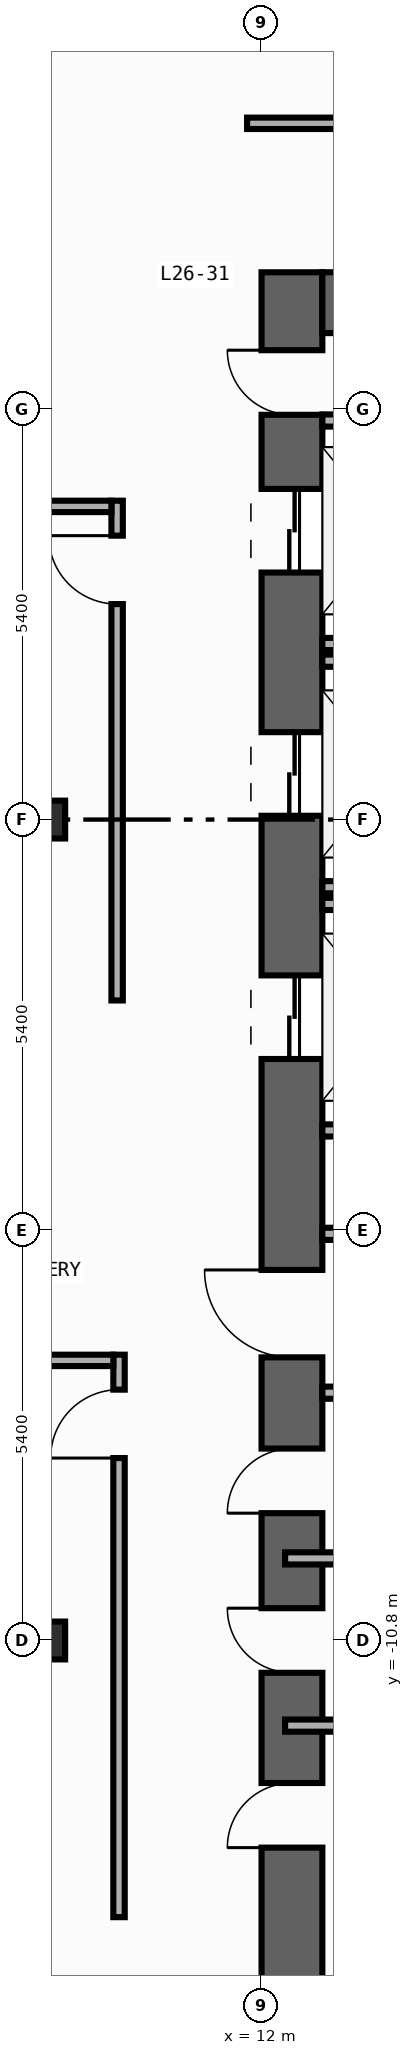
"""IFC4 building model, lengths in metres.
Left out: names, types, materials, properties, quantities, classifications, styles, units other than length and angle.
Written with IfcOpenShell. Run it as: python <this file> out.ifc"""

import sys

from ifc_helpers import new_model, si_unit, direction, frame, frame_2d, origin, origin_2d, place, context, subcontext, project, spatial, rectangle, i_section, extrude, element, fill, save


model = new_model("IFC4")
c1 = context("Model", 3, precision=1e-05, world=origin(), true_north=direction((0.0, 1.0)))
c2 = subcontext(c1, "Body", "Model", "MODEL_VIEW")
j1 = project(units=[si_unit("LENGTHUNIT", "METRE"), si_unit("PLANEANGLEUNIT", "RADIAN")], contexts=[c1])
p1 = place(None, origin())
s1 = spatial("IfcSite", under=j1, at=p1, CompositionType="ELEMENT")
p2 = place(p1, origin())
s2 = spatial("IfcBuilding", under=s1, at=p2, CompositionType="ELEMENT")
p3 = place(p2, frame((0.0, 0.0, 114.2)))
s3 = spatial("IfcBuildingStorey", under=s2, at=p3, CompositionType="ELEMENT", Elevation=114.2)
p4 = place(p3, frame((12.4, -19.8, 0.0), z_axis=(0.0, 0.0, 1.0), x_axis=(0.0, 1.0, 0.0)))
e1 = element("IfcWall", 1, at=p4, inside=s3, PredefinedType="SHEAR", context=c2, shape_type="SweptSolid", body=[
    extrude(rectangle(XDim=27.0, YDim=0.8, at=frame_2d((13.5, 0.0))), origin(), (0.0, 0.0, 1.0), 3.94),
])
p5 = place(p4, frame((23.05, 0.0, 0.0)))
e2 = element("IfcOpeningElement", 2, at=p5, cuts=e1, PredefinedType="OPENING", context=c2, shape_type="SweptSolid", body=[
    extrude(rectangle(XDim=1.1, YDim=2.2, at=frame_2d((0.55, 1.1))), frame((0.0, 0.41, 0.0), z_axis=(0.0, -1.0, 0.0), x_axis=(1.0, 0.0, 0.0)), (0.0, 0.0, 1.0), 0.82),
])
p6 = place(p4, frame((19.85, 0.0, 0.0)))
e3 = element("IfcOpeningElement", 3, at=p6, cuts=e1, PredefinedType="OPENING", context=c2, shape_type="SweptSolid", body=[
    extrude(rectangle(XDim=1.1, YDim=2.2, at=frame_2d((0.55, 1.1))), frame((0.0, 0.41, 0.0), z_axis=(0.0, -1.0, 0.0), x_axis=(1.0, 0.0, 0.0)), (0.0, 0.0, 1.0), 0.82),
])
p7 = place(p4, frame((16.65, 0.0, 0.0)))
e4 = element("IfcOpeningElement", 4, at=p7, cuts=e1, PredefinedType="OPENING", context=c2, shape_type="SweptSolid", body=[
    extrude(rectangle(XDim=1.1, YDim=2.2, at=frame_2d((0.55, 1.1))), frame((0.0, 0.41, 0.0), z_axis=(0.0, -1.0, 0.0), x_axis=(1.0, 0.0, 0.0)), (0.0, 0.0, 1.0), 0.82),
])
p8 = place(p4, frame((6.275, 0.0, 0.0)))
e5 = element("IfcOpeningElement", 5, at=p8, cuts=e1, PredefinedType="OPENING", context=c2, shape_type="SweptSolid", body=[
    extrude(rectangle(XDim=0.85, YDim=2.1, at=frame_2d((0.425, 1.05))), frame((0.0, 0.41, 0.0), z_axis=(0.0, -1.0, 0.0), x_axis=(1.0, 0.0, 0.0)), (0.0, 0.0, 1.0), 0.82),
])
p9 = place(p4, frame((8.575, 0.0, 0.0)))
e6 = element("IfcOpeningElement", 6, at=p9, cuts=e1, PredefinedType="OPENING", context=c2, shape_type="SweptSolid", body=[
    extrude(rectangle(XDim=0.85, YDim=2.1, at=frame_2d((0.425, 1.05))), frame((0.0, 0.41, 0.0), z_axis=(0.0, -1.0, 0.0), x_axis=(1.0, 0.0, 0.0)), (0.0, 0.0, 1.0), 0.82),
])
p10 = place(p4, frame((10.675, 0.0, 0.0)))
e7 = element("IfcOpeningElement", 7, at=p10, cuts=e1, PredefinedType="OPENING", context=c2, shape_type="SweptSolid", body=[
    extrude(rectangle(XDim=0.85, YDim=2.1, at=frame_2d((0.425, 1.05))), frame((0.0, 0.41, 0.0), z_axis=(0.0, -1.0, 0.0), x_axis=(1.0, 0.0, 0.0)), (0.0, 0.0, 1.0), 0.82),
])
p11 = place(p4, frame((12.725, 0.0, 0.0)))
e8 = element("IfcOpeningElement", 8, at=p11, cuts=e1, PredefinedType="OPENING", context=c2, shape_type="SweptSolid", body=[
    extrude(rectangle(XDim=1.15, YDim=2.2, at=frame_2d((0.575, 1.1))), frame((0.0, 0.41, 0.0), z_axis=(0.0, -1.0, 0.0), x_axis=(1.0, 0.0, 0.0)), (0.0, 0.0, 1.0), 0.82),
])
p12 = place(p4, frame((25.125, 0.0, 0.0)))
e9 = element("IfcOpeningElement", 9, at=p12, cuts=e1, PredefinedType="OPENING", context=c2, shape_type="SweptSolid", body=[
    extrude(rectangle(XDim=0.85, YDim=2.1, at=frame_2d((0.425, 1.05))), frame((0.0, 0.41, 0.0), z_axis=(0.0, -1.0, 0.0), x_axis=(1.0, 0.0, 0.0)), (0.0, 0.0, 1.0), 0.82),
])
p13 = place(p3, frame((12.8, 6.8, 0.0), z_axis=(0.0, 0.0, 1.0), x_axis=(1.0, 0.0, 0.0)))
e10 = element("IfcWall", 10, at=p13, inside=s3, PredefinedType="SHEAR", context=c2, shape_type="SweptSolid", body=[
    extrude(rectangle(XDim=6.8, YDim=0.8, at=frame_2d((3.4, 0.0))), origin(), (0.0, 0.0, 1.0), 3.94),
])
for number, where, z_axis, x_axis in (
    (11, (9.2, -10.8, 0.0), (0.0, 0.0, 1.0), (1.0, 0.0, 0.0)),
    (12, (9.2, 0.0, 0.0), (0.0, 0.0, 1.0), (1.0, 0.0, 0.0)),
):
    element("IfcColumn", number, at=place(p3, frame(where, z_axis=z_axis, x_axis=x_axis)), inside=s3, PredefinedType="COLUMN", context=c2, shape_type="SweptSolid", body=[
        extrude(i_section(OverallWidth=0.432, OverallDepth=0.498, WebThickness=0.045, FlangeThickness=0.07, FilletRadius=0.022, at=origin_2d()), origin(), (0.0, 0.0, 1.0), 4.2),
    ])
for number, where, z_axis, x_axis in (
    (13, (12.8, 2.31, 0.0), (0.0, 0.0, 1.0), (1.0, 0.0, 0.0)),
    (14, (12.8, -0.89, 0.0), (0.0, 0.0, 1.0), (1.0, 0.0, 0.0)),
    (15, (12.8, 2.09, 0.0), (0.0, 0.0, 1.0), (1.0, 0.0, 0.0)),
    (16, (12.8, -4.09, 0.0), (0.0, 0.0, 1.0), (1.0, 0.0, 0.0)),
    (17, (12.8, -1.11, 0.0), (0.0, 0.0, 1.0), (1.0, 0.0, 0.0)),
):
    element("IfcWall", number, at=place(p3, frame(where, z_axis=z_axis, x_axis=x_axis)), inside=s3, PredefinedType="STANDARD", context=c2, shape_type="SweptSolid", body=[
        extrude(rectangle(XDim=2.19, YDim=0.16, at=frame_2d((1.095, 0.0))), origin(), (0.0, 0.0, 1.0), 3.94),
    ])
for number, where, z_axis, x_axis in (
    (18, (12.8, -5.45, 0.0), (0.0, 0.0, 1.0), (1.0, 0.0, 0.0)),
    (19, (12.8, -7.54, 0.0), (0.0, 0.0, 1.0), (1.0, 0.0, 0.0)),
    (20, (12.8, 5.25, 0.0), (0.0, 0.0, 1.0), (1.0, 0.0, 0.0)),
):
    element("IfcWall", number, at=place(p3, frame(where, z_axis=z_axis, x_axis=x_axis)), inside=s3, PredefinedType="STANDARD", context=c2, shape_type="SweptSolid", body=[
        extrude(rectangle(XDim=2.6, YDim=0.16, at=frame_2d((1.3, 0.0))), origin(), (0.0, 0.0, 1.0), 3.94),
    ])
for number, where, z_axis, x_axis in (
    (21, (12.31, -11.92, 0.0), (0.0, 0.0, 1.0), (1.0, 0.0, 0.0)),
    (22, (12.31, -9.72, 0.0), (0.0, 0.0, 1.0), (1.0, 0.0, 0.0)),
):
    element("IfcWall", number, at=place(p3, frame(where, z_axis=z_axis, x_axis=x_axis)), inside=s3, PredefinedType="PARTITIONING", context=c2, shape_type="SweptSolid", body=[
        extrude(rectangle(XDim=3.065, YDim=0.16, at=frame_2d((1.532, 0.0))), origin(), (0.0, 0.0, 1.0), 3.94),
    ])
p14 = place(p3, frame((10.1, -2.38, 0.0), z_axis=(0.0, 0.0, 1.0), x_axis=(0.0, 1.0, 0.0)))
e23 = element("IfcWall", 23, at=p14, inside=s3, PredefinedType="PARTITIONING", context=c2, shape_type="SweptSolid", body=[
    extrude(rectangle(XDim=6.575, YDim=0.15, at=frame_2d((3.288, 0.0))), origin(), (0.0, 0.0, 1.0), 3.94),
])
p15 = place(p14, frame((5.215, 0.0, 0.0)))
e24 = element("IfcOpeningElement", 24, at=p15, cuts=e23, PredefinedType="OPENING", context=c2, shape_type="SweptSolid", body=[
    extrude(rectangle(XDim=0.9, YDim=2.15, at=frame_2d((0.45, 1.075))), frame((0.0, 0.085, 0.0), z_axis=(0.0, -1.0, 0.0), x_axis=(1.0, 0.0, 0.0)), (0.0, 0.0, 1.0), 0.17),
])
p16 = place(p3, frame((10.125, -14.44, 0.0), z_axis=(0.0, 0.0, 1.0), x_axis=(0.0, 1.0, 0.0)))
e25 = element("IfcWall", 25, at=p16, inside=s3, PredefinedType="PARTITIONING", context=c2, shape_type="SweptSolid", body=[
    extrude(rectangle(XDim=7.4, YDim=0.15, at=frame_2d((3.7, 0.0))), origin(), (0.0, 0.0, 1.0), 3.94),
])
p17 = place(p16, frame((6.04, 0.0, 0.0)))
e26 = element("IfcOpeningElement", 26, at=p17, cuts=e25, PredefinedType="OPENING", context=c2, shape_type="SweptSolid", body=[
    extrude(rectangle(XDim=0.9, YDim=2.15, at=frame_2d((0.45, 1.075))), frame((0.0, 0.085, 0.0), z_axis=(0.0, -1.0, 0.0), x_axis=(1.0, 0.0, 0.0)), (0.0, 0.0, 1.0), 0.17),
])
p18 = place(p3, frame((3.78, 4.12, 0.0), z_axis=(0.0, 0.0, 1.0), x_axis=(1.0, 0.0, 0.0)))
e27 = element("IfcWall", 27, at=p18, inside=s3, PredefinedType="PARTITIONING", context=c2, shape_type="SweptSolid", body=[
    extrude(rectangle(XDim=6.245, YDim=0.15, at=frame_2d((3.123, 0.0))), origin(), (0.0, 0.0, 1.0), 3.94),
])
p19 = place(p18, frame((0.46, 0.0, 0.0)))
e28 = element("IfcOpeningElement", 28, at=p19, cuts=e27, PredefinedType="OPENING", context=c2, shape_type="SweptSolid", body=[
    extrude(rectangle(XDim=0.9, YDim=2.15, at=frame_2d((0.45, 1.075))), frame((0.0, 0.085, 0.0), z_axis=(0.0, -1.0, 0.0), x_axis=(1.0, 0.0, 0.0)), (0.0, 0.0, 1.0), 0.17),
])
p20 = place(p3, frame((-0.015, -7.115, 0.0), z_axis=(0.0, 0.0, 1.0), x_axis=(1.0, 0.0, 0.0)))
e29 = element("IfcWall", 29, at=p20, inside=s3, PredefinedType="PARTITIONING", context=c2, shape_type="SweptSolid", body=[
    extrude(rectangle(XDim=10.065, YDim=0.15, at=frame_2d((5.032, 0.0))), origin(), (0.0, 0.0, 1.0), 3.94),
])
p21 = place(p20, frame((0.46, 0.0, 0.0)))
e30 = element("IfcOpeningElement", 30, at=p21, cuts=e29, PredefinedType="OPENING", context=c2, shape_type="SweptSolid", body=[
    extrude(rectangle(XDim=0.9, YDim=2.15, at=frame_2d((0.45, 1.075))), frame((0.0, 0.085, 0.0), z_axis=(0.0, -1.0, 0.0), x_axis=(1.0, 0.0, 0.0)), (0.0, 0.0, 1.0), 0.17),
])
p22 = place(p3, frame((11.81, 9.16, 0.0), z_axis=(0.0, 0.0, 1.0), x_axis=(1.0, 0.0, 0.0)))
e31 = element("IfcWall", 31, at=p22, inside=s3, PredefinedType="PARTITIONING", context=c2, shape_type="SweptSolid", body=[
    extrude(rectangle(XDim=8.83, YDim=0.15, at=frame_2d((4.415, 0.0))), origin(), (0.0, 0.0, 1.0), 3.94),
])
p23 = place(p22, frame((5.067, 0.0, 0.0)))
e32 = element("IfcOpeningElement", 32, at=p23, cuts=e31, PredefinedType="OPENING", context=c2, shape_type="SweptSolid", body=[
    extrude(rectangle(XDim=0.9, YDim=2.15, at=frame_2d((0.45, 1.075))), frame((0.0, 0.085, 0.0), z_axis=(0.0, -1.0, 0.0), x_axis=(1.0, 0.0, 0.0)), (0.0, 0.0, 1.0), 0.17),
])
p24 = place(p5, origin())
e33 = element("IfcDoor", 33, at=p24, inside=s3, OperationType="DOUBLE_DOOR_SLIDING", PredefinedType="DOOR", context=c2, shape_type="SweptSolid", body=[
    extrude(rectangle(XDim=1.1, YDim=2.2, at=frame_2d((0.55, 1.1))), frame((0.0, 0.025, 0.0), z_axis=(0.0, -1.0, 0.0), x_axis=(1.0, 0.0, 0.0)), (0.0, 0.0, 1.0), 0.05),
])
fill(e2, e33)
p25 = place(p6, origin())
e34 = element("IfcDoor", 34, at=p25, inside=s3, OperationType="DOUBLE_DOOR_SLIDING", PredefinedType="DOOR", context=c2, shape_type="SweptSolid", body=[
    extrude(rectangle(XDim=1.1, YDim=2.2, at=frame_2d((0.55, 1.1))), frame((0.0, 0.025, 0.0), z_axis=(0.0, -1.0, 0.0), x_axis=(1.0, 0.0, 0.0)), (0.0, 0.0, 1.0), 0.05),
])
fill(e3, e34)
p26 = place(p7, origin())
e35 = element("IfcDoor", 35, at=p26, inside=s3, OperationType="DOUBLE_DOOR_SLIDING", PredefinedType="DOOR", context=c2, shape_type="SweptSolid", body=[
    extrude(rectangle(XDim=1.1, YDim=2.2, at=frame_2d((0.55, 1.1))), frame((0.0, 0.025, 0.0), z_axis=(0.0, -1.0, 0.0), x_axis=(1.0, 0.0, 0.0)), (0.0, 0.0, 1.0), 0.05),
])
fill(e4, e35)
p27 = place(p8, origin())
e36 = element("IfcDoor", 36, at=p27, inside=s3, OperationType="SINGLE_SWING_LEFT", PredefinedType="DOOR", context=c2, shape_type="SweptSolid", body=[
    extrude(rectangle(XDim=0.85, YDim=2.1, at=frame_2d((0.425, 1.05))), frame((0.0, 0.025, 0.0), z_axis=(0.0, -1.0, 0.0), x_axis=(1.0, 0.0, 0.0)), (0.0, 0.0, 1.0), 0.05),
])
fill(e5, e36)
p28 = place(p9, origin())
e37 = element("IfcDoor", 37, at=p28, inside=s3, OperationType="SINGLE_SWING_RIGHT", PredefinedType="DOOR", context=c2, shape_type="SweptSolid", body=[
    extrude(rectangle(XDim=0.85, YDim=2.1, at=frame_2d((0.425, 1.05))), frame((0.0, 0.025, 0.0), z_axis=(0.0, -1.0, 0.0), x_axis=(1.0, 0.0, 0.0)), (0.0, 0.0, 1.0), 0.05),
])
fill(e6, e37)
p29 = place(p10, origin())
e38 = element("IfcDoor", 38, at=p29, inside=s3, OperationType="SINGLE_SWING_LEFT", PredefinedType="DOOR", context=c2, shape_type="SweptSolid", body=[
    extrude(rectangle(XDim=0.85, YDim=2.1, at=frame_2d((0.425, 1.05))), frame((0.0, 0.025, 0.0), z_axis=(0.0, -1.0, 0.0), x_axis=(1.0, 0.0, 0.0)), (0.0, 0.0, 1.0), 0.05),
])
fill(e7, e38)
p30 = place(p11, origin())
e39 = element("IfcDoor", 39, at=p30, inside=s3, OperationType="SINGLE_SWING_RIGHT", PredefinedType="DOOR", context=c2, shape_type="SweptSolid", body=[
    extrude(rectangle(XDim=1.15, YDim=2.2, at=frame_2d((0.575, 1.1))), frame((0.0, 0.025, 0.0), z_axis=(0.0, -1.0, 0.0), x_axis=(1.0, 0.0, 0.0)), (0.0, 0.0, 1.0), 0.05),
])
fill(e8, e39)
p31 = place(p12, origin())
e40 = element("IfcDoor", 40, at=p31, inside=s3, OperationType="SINGLE_SWING_RIGHT", PredefinedType="DOOR", context=c2, shape_type="SweptSolid", body=[
    extrude(rectangle(XDim=0.85, YDim=2.1, at=frame_2d((0.425, 1.05))), frame((0.0, 0.025, 0.0), z_axis=(0.0, -1.0, 0.0), x_axis=(1.0, 0.0, 0.0)), (0.0, 0.0, 1.0), 0.05),
])
fill(e9, e40)
p32 = place(p15, origin())
e41 = element("IfcDoor", 41, at=p32, inside=s3, OperationType="SINGLE_SWING_RIGHT", PredefinedType="DOOR", context=c2, shape_type="SweptSolid", body=[
    extrude(rectangle(XDim=0.9, YDim=2.15, at=frame_2d((0.45, 1.075))), frame((0.0, 0.025, 0.0), z_axis=(0.0, -1.0, 0.0), x_axis=(1.0, 0.0, 0.0)), (0.0, 0.0, 1.0), 0.05),
])
fill(e24, e41)
p33 = place(p17, origin())
e42 = element("IfcDoor", 42, at=p33, inside=s3, OperationType="SINGLE_SWING_LEFT", PredefinedType="DOOR", context=c2, shape_type="SweptSolid", body=[
    extrude(rectangle(XDim=0.9, YDim=2.15, at=frame_2d((0.45, 1.075))), frame((0.0, 0.025, 0.0), z_axis=(0.0, -1.0, 0.0), x_axis=(1.0, 0.0, 0.0)), (0.0, 0.0, 1.0), 0.05),
])
fill(e26, e42)
save(model, sys.argv[1])
